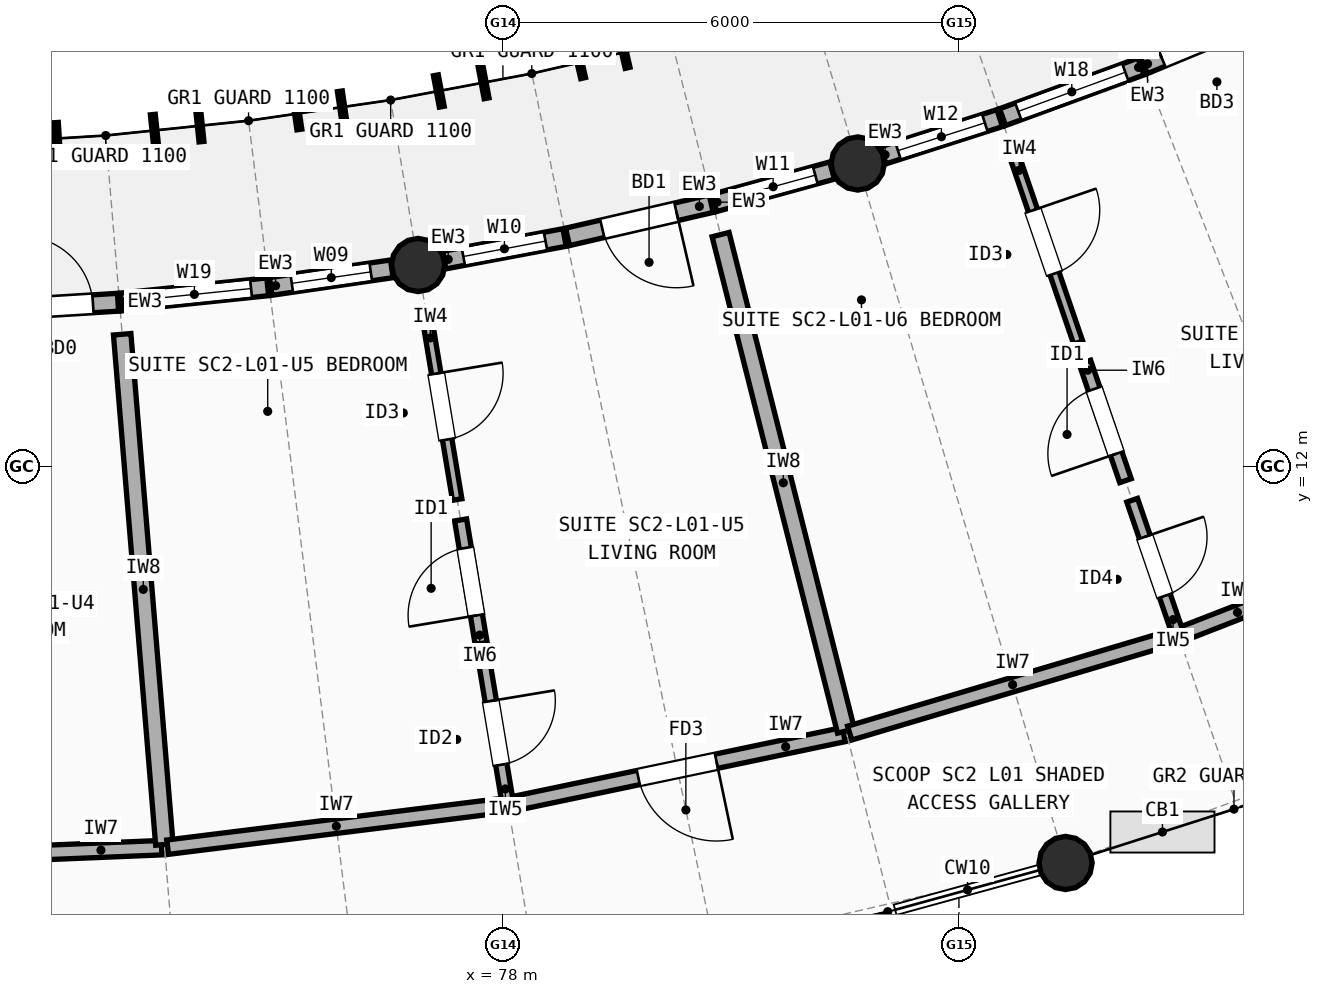
"""IFC4 building model, lengths in metres.
Left out: names, types, materials, properties, quantities, classifications, styles, units other than length and angle.
Written with IfcOpenShell. Run it as: python <this file> out.ifc"""

import sys

from ifc_helpers import new_model, si_unit, direction, frame, frame_2d, origin, origin_2d, place, context, subcontext, project, spatial, rectangle, circle, extrude, element, fill, save


model = new_model("IFC4")
c1 = context("Model", 3, precision=1e-05, world=origin(), true_north=direction((0.0, 1.0)))
c2 = subcontext(c1, "Body", "Model", "MODEL_VIEW")
j1 = project(units=[si_unit("LENGTHUNIT", "METRE"), si_unit("PLANEANGLEUNIT", "RADIAN")], contexts=[c1])
p1 = place(None, origin())
s1 = spatial("IfcSite", under=j1, at=p1, CompositionType="ELEMENT")
p2 = place(p1, origin())
s2 = spatial("IfcBuilding", under=s1, at=p2, CompositionType="ELEMENT")
p3 = place(p2, frame((0.0, 0.0, 4.5)))
s3 = spatial("IfcBuildingStorey", under=s2, at=p3, CompositionType="ELEMENT", Elevation=4.5)
for number, where, z_axis, x_axis in (
    (1, (76.885, 14.652, 0.0), (0.0, 0.0, 1.0), (1.0, 0.0, 0.0)),
    (2, (82.669, 15.988, 0.0), (0.0, 0.0, 1.0), (1.0, 0.0, 0.0)),
    (3, (85.403, 6.785, 0.0), (0.0, 0.0, 1.0), (1.0, 0.0, 0.0)),
):
    element("IfcColumn", number, at=place(p3, frame(where, z_axis=z_axis, x_axis=x_axis)), inside=s3, PredefinedType="COLUMN", context=c2, shape_type="SweptSolid", body=[
        extrude(circle(Radius=0.35, at=origin_2d()), origin(), (0.0, 0.0, 1.0), 2.948),
    ])
p4 = place(p3, frame((71.329, 14.062, 0.0), z_axis=(0.0, 0.0, 1.0), x_axis=(0.998084310064, 0.061868489594, 0.0)))
e4 = element("IfcWall", 4, at=p4, inside=s3, PredefinedType="STANDARD", context=c2, shape_type="SweptSolid", body=[
    extrude(rectangle(XDim=1.61, YDim=0.235, at=frame_2d((0.805, 0.0))), origin(), (0.0, 0.0, 1.0), 2.684),
])
p5 = place(p4, frame((0.33, 0.0, 0.0)))
e5 = element("IfcOpeningElement", 5, at=p5, cuts=e4, PredefinedType="OPENING", context=c2, shape_type="SweptSolid", body=[
    extrude(rectangle(XDim=0.95, YDim=2.12, at=frame_2d((0.475, 1.06))), frame((0.0, 0.127, 0.0), z_axis=(0.0, -1.0, 0.0), x_axis=(1.0, 0.0, 0.0)), (0.0, 0.0, 1.0), 0.255),
])
p6 = place(p3, frame((72.976, 14.165, 0.0), z_axis=(0.0, 0.0, 1.0), x_axis=(0.994688684624, 0.10292920228, 0.0)))
e6 = element("IfcWall", 6, at=p6, inside=s3, PredefinedType="STANDARD", context=c2, shape_type="SweptSolid", body=[
    extrude(rectangle(XDim=1.94, YDim=0.235, at=frame_2d((0.97, 0.0))), origin(), (0.0, 0.0, 1.0), 2.684),
])
p7 = place(p6, frame((0.22, 0.0, 0.85)))
e7 = element("IfcOpeningElement", 7, at=p7, cuts=e6, PredefinedType="OPENING", context=c2, shape_type="SweptSolid", body=[
    extrude(rectangle(XDim=1.5, YDim=1.5, at=frame_2d((0.75, 0.75))), frame((0.0, 0.127, 0.0), z_axis=(0.0, -1.0, 0.0), x_axis=(1.0, 0.0, 0.0)), (0.0, 0.0, 1.0), 0.255),
])
p8 = place(p3, frame((74.945, 14.37, 0.0), z_axis=(0.0, 0.0, 1.0), x_axis=(0.98961312767, 0.143756243492, 0.0)))
e8 = element("IfcWall", 8, at=p8, inside=s3, PredefinedType="STANDARD", context=c2, shape_type="SweptSolid", body=[
    extrude(rectangle(XDim=1.61, YDim=0.235, at=frame_2d((0.805, 0.0))), origin(), (0.0, 0.0, 1.0), 2.684),
])
p9 = place(p8, frame((0.28, 0.0, 0.85)))
e9 = element("IfcOpeningElement", 9, at=p9, cuts=e8, PredefinedType="OPENING", context=c2, shape_type="SweptSolid", body=[
    extrude(rectangle(XDim=1.05, YDim=1.35, at=frame_2d((0.525, 0.675))), frame((0.0, 0.127, 0.0), z_axis=(0.0, -1.0, 0.0), x_axis=(1.0, 0.0, 0.0)), (0.0, 0.0, 1.0), 0.255),
])
p10 = place(p3, frame((77.229, 14.717, 0.0), z_axis=(0.0, 0.0, 1.0), x_axis=(0.982794848755, 0.184700528589, 0.0)))
e10 = element("IfcWall", 10, at=p10, inside=s3, PredefinedType="STANDARD", context=c2, shape_type="SweptSolid", body=[
    extrude(rectangle(XDim=1.61, YDim=0.235, at=frame_2d((0.805, 0.0))), origin(), (0.0, 0.0, 1.0), 2.684),
])
p11 = place(p10, frame((0.255, 0.0, 0.85)))
e11 = element("IfcOpeningElement", 11, at=p11, cuts=e10, PredefinedType="OPENING", context=c2, shape_type="SweptSolid", body=[
    extrude(rectangle(XDim=1.1, YDim=1.45, at=frame_2d((0.55, 0.725))), frame((0.0, 0.127, 0.0), z_axis=(0.0, -1.0, 0.0), x_axis=(1.0, 0.0, 0.0)), (0.0, 0.0, 1.0), 0.255),
])
p12 = place(p3, frame((78.85, 15.022, 0.0), z_axis=(0.0, 0.0, 1.0), x_axis=(0.974359373104, 0.224997360081, 0.0)))
e12 = element("IfcWall", 12, at=p12, inside=s3, PredefinedType="STANDARD", context=c2, shape_type="SweptSolid", body=[
    extrude(rectangle(XDim=1.94, YDim=0.235, at=frame_2d((0.97, 0.0))), origin(), (0.0, 0.0, 1.0), 2.684),
])
p13 = place(p12, frame((0.47, 0.0, 0.0)))
e13 = element("IfcOpeningElement", 13, at=p13, cuts=e12, PredefinedType="OPENING", context=c2, shape_type="SweptSolid", body=[
    extrude(rectangle(XDim=1.0, YDim=2.15, at=frame_2d((0.5, 1.075))), frame((0.0, 0.127, 0.0), z_axis=(0.0, -1.0, 0.0), x_axis=(1.0, 0.0, 0.0)), (0.0, 0.0, 1.0), 0.255),
])
p14 = place(p3, frame((80.779, 15.468, 0.0), z_axis=(0.0, 0.0, 1.0), x_axis=(0.96427223836, 0.264913288318, 0.0)))
e14 = element("IfcWall", 14, at=p14, inside=s3, PredefinedType="STANDARD", context=c2, shape_type="SweptSolid", body=[
    extrude(rectangle(XDim=1.61, YDim=0.235, at=frame_2d((0.805, 0.0))), origin(), (0.0, 0.0, 1.0), 2.684),
])
p15 = place(p14, frame((0.23, 0.0, 0.85)))
e15 = element("IfcOpeningElement", 15, at=p15, cuts=e14, PredefinedType="OPENING", context=c2, shape_type="SweptSolid", body=[
    extrude(rectangle(XDim=1.15, YDim=1.45, at=frame_2d((0.575, 0.725))), frame((0.0, 0.127, 0.0), z_axis=(0.0, -1.0, 0.0), x_axis=(1.0, 0.0, 0.0)), (0.0, 0.0, 1.0), 0.255),
])
p16 = place(p3, frame((83.003, 16.094, 0.0), z_axis=(0.0, 0.0, 1.0), x_axis=(0.952508629145, 0.304511594861, 0.0)))
e16 = element("IfcWall", 16, at=p16, inside=s3, PredefinedType="STANDARD", context=c2, shape_type="SweptSolid", body=[
    extrude(rectangle(XDim=1.61, YDim=0.235, at=frame_2d((0.805, 0.0))), origin(), (0.0, 0.0, 1.0), 2.684),
])
p17 = place(p16, frame((0.205, 0.0, 0.85)))
e17 = element("IfcOpeningElement", 17, at=p17, cuts=e16, PredefinedType="OPENING", context=c2, shape_type="SweptSolid", body=[
    extrude(rectangle(XDim=1.2, YDim=1.35, at=frame_2d((0.6, 0.675))), frame((0.0, 0.127, 0.0), z_axis=(0.0, -1.0, 0.0), x_axis=(1.0, 0.0, 0.0)), (0.0, 0.0, 1.0), 0.255),
])
p18 = place(p3, frame((84.574, 16.597, 0.0), z_axis=(0.0, 0.0, 1.0), x_axis=(0.939178301307, 0.343429932235, 0.0)))
e18 = element("IfcWall", 18, at=p18, inside=s3, PredefinedType="STANDARD", context=c2, shape_type="SweptSolid", body=[
    extrude(rectangle(XDim=1.94, YDim=0.235, at=frame_2d((0.97, 0.0))), origin(), (0.0, 0.0, 1.0), 2.684),
])
p19 = place(p18, frame((0.22, 0.0, 0.85)))
e19 = element("IfcOpeningElement", 19, at=p19, cuts=e18, PredefinedType="OPENING", context=c2, shape_type="SweptSolid", body=[
    extrude(rectangle(XDim=1.5, YDim=1.4, at=frame_2d((0.75, 0.7))), frame((0.0, 0.127, 0.0), z_axis=(0.0, -1.0, 0.0), x_axis=(1.0, 0.0, 0.0)), (0.0, 0.0, 1.0), 0.255),
])
p20 = place(p3, frame((86.433, 17.278, 0.0), z_axis=(0.0, 0.0, 1.0), x_axis=(0.924159027547, 0.382007973481, 0.0)))
e20 = element("IfcWall", 20, at=p20, inside=s3, PredefinedType="STANDARD", context=c2, shape_type="SweptSolid", body=[
    extrude(rectangle(XDim=1.61, YDim=0.235, at=frame_2d((0.805, 0.0))), origin(), (0.0, 0.0, 1.0), 2.684),
])
p21 = place(p20, frame((0.255, 0.0, 0.0)))
e21 = element("IfcOpeningElement", 21, at=p21, cuts=e20, PredefinedType="OPENING", context=c2, shape_type="SweptSolid", body=[
    extrude(rectangle(XDim=1.1, YDim=2.15, at=frame_2d((0.55, 1.075))), frame((0.0, 0.127, 0.0), z_axis=(0.0, -1.0, 0.0), x_axis=(1.0, 0.0, 0.0)), (0.0, 0.0, 1.0), 0.255),
])
p22 = place(p3, frame((69.04, 6.802, 0.0), z_axis=(0.0, 0.0, 1.0), x_axis=(0.999148329529, 0.041262762871, 0.0)))
e22 = element("IfcWall", 22, at=p22, inside=s3, PredefinedType="SOLIDWALL", context=c2, shape_type="SweptSolid", body=[
    extrude(rectangle(XDim=4.473, YDim=0.19, at=frame_2d((2.237, 0.0))), origin(), (0.0, 0.0, 1.0), 2.722),
])
p23 = place(p22, frame((1.747, 0.0, 0.0)))
e23 = element("IfcOpeningElement", 23, at=p23, cuts=e22, PredefinedType="OPENING", context=c2, shape_type="SweptSolid", body=[
    extrude(rectangle(XDim=0.98, YDim=2.15, at=frame_2d((0.49, 1.075))), frame((0.0, 0.105, 0.0), z_axis=(0.0, -1.0, 0.0), x_axis=(1.0, 0.0, 0.0)), (0.0, 0.0, 1.0), 0.21),
])
p24 = place(p3, frame((72.991, 13.741, 0.0), z_axis=(0.0, 0.0, 1.0), x_axis=(0.082418569382, -0.996597802236, 0.0)))
e24 = element("IfcWall", 24, at=p24, inside=s3, PredefinedType="SOLIDWALL", context=c2, shape_type="SweptSolid", body=[
    extrude(rectangle(XDim=6.736, YDim=0.23, at=frame_2d((3.368, 0.0))), origin(), (0.0, 0.0, 1.0), 2.742),
])
p25 = place(p3, frame((73.589, 6.993, 0.0), z_axis=(0.0, 0.0, 1.0), x_axis=(0.992349088432, 0.123463705959, 0.0)))
e25 = element("IfcWall", 25, at=p25, inside=s3, PredefinedType="SOLIDWALL", context=c2, shape_type="SweptSolid", body=[
    extrude(rectangle(XDim=4.473, YDim=0.19, at=frame_2d((2.236, 0.0))), origin(), (0.0, 0.0, 1.0), 2.762),
])
p26 = place(p3, frame((78.107, 7.558, 0.0), z_axis=(0.0, 0.0, 1.0), x_axis=(0.978806148413, 0.204788973894, 0.0)))
e26 = element("IfcWall", 26, at=p26, inside=s3, PredefinedType="SOLIDWALL", context=c2, shape_type="SweptSolid", body=[
    extrude(rectangle(XDim=4.473, YDim=0.19, at=frame_2d((2.236, 0.0))), origin(), (0.0, 0.0, 1.0), 2.742),
])
p27 = place(p26, frame((1.711, 0.0, 0.0)))
e27 = element("IfcOpeningElement", 27, at=p27, cuts=e26, PredefinedType="OPENING", context=c2, shape_type="SweptSolid", body=[
    extrude(rectangle(XDim=1.05, YDim=2.15, at=frame_2d((0.525, 1.075))), frame((0.0, 0.105, 0.0), z_axis=(0.0, -1.0, 0.0), x_axis=(1.0, 0.0, 0.0)), (0.0, 0.0, 1.0), 0.21),
])
p28 = place(p3, frame((76.991, 14.013, 0.0), z_axis=(0.0, 0.0, 1.0), x_axis=(0.16420741421, -0.986425833562, 0.0)))
e28 = element("IfcWall", 28, at=p28, inside=s3, PredefinedType="PARTITIONING", context=c2, shape_type="SweptSolid", body=[
    extrude(rectangle(XDim=2.48, YDim=0.125, at=frame_2d((1.24, 0.0))), origin(), (0.0, 0.0, 1.0), 2.722),
])
p29 = place(p28, frame((0.8, 0.0, 0.0)))
e29 = element("IfcOpeningElement", 29, at=p29, cuts=e28, PredefinedType="OPENING", context=c2, shape_type="SweptSolid", body=[
    extrude(rectangle(XDim=0.88, YDim=2.1, at=frame_2d((0.44, 1.05))), frame((0.0, 0.073, 0.0), z_axis=(0.0, -1.0, 0.0), x_axis=(1.0, 0.0, 0.0)), (0.0, 0.0, 1.0), 0.145),
])
p30 = place(p3, frame((77.443, 11.298, 0.0), z_axis=(0.0, 0.0, 1.0), x_axis=(0.164158726706, -0.986433937193, 0.0)))
e30 = element("IfcWall", 30, at=p30, inside=s3, PredefinedType="PLUMBINGWALL", context=c2, shape_type="SweptSolid", body=[
    extrude(rectangle(XDim=1.648, YDim=0.16, at=frame_2d((0.824, 0.0))), origin(), (0.0, 0.0, 1.0), 2.722),
])
p31 = place(p30, frame((0.374, 0.0, 0.0)))
e31 = element("IfcOpeningElement", 31, at=p31, cuts=e30, PredefinedType="OPENING", context=c2, shape_type="SweptSolid", body=[
    extrude(rectangle(XDim=0.9, YDim=2.1, at=frame_2d((0.45, 1.05))), frame((0.0, 0.09, 0.0), z_axis=(0.0, -1.0, 0.0), x_axis=(1.0, 0.0, 0.0)), (0.0, 0.0, 1.0), 0.18),
])
p32 = place(p3, frame((77.759, 9.404, 0.0), z_axis=(0.0, 0.0, 1.0), x_axis=(0.164269882379, -0.986415432636, 0.0)))
e32 = element("IfcWall", 32, at=p32, inside=s3, PredefinedType="PARTITIONING", context=c2, shape_type="SweptSolid", body=[
    extrude(rectangle(XDim=1.84, YDim=0.15, at=frame_2d((0.92, 0.0))), origin(), (0.0, 0.0, 1.0), 2.722),
])
p33 = place(p32, frame((0.495, 0.0, 0.0)))
e33 = element("IfcOpeningElement", 33, at=p33, cuts=e32, PredefinedType="OPENING", context=c2, shape_type="SweptSolid", body=[
    extrude(rectangle(XDim=0.85, YDim=2.1, at=frame_2d((0.425, 1.05))), frame((0.0, 0.085, 0.0), z_axis=(0.0, -1.0, 0.0), x_axis=(1.0, 0.0, 0.0)), (0.0, 0.0, 1.0), 0.17),
])
p34 = place(p3, frame((80.864, 15.052, 0.0), z_axis=(0.0, 0.0, 1.0), x_axis=(0.244982481903, -0.969527505314, 0.0)))
e34 = element("IfcWall", 34, at=p34, inside=s3, PredefinedType="SOLIDWALL", context=c2, shape_type="SweptSolid", body=[
    extrude(rectangle(XDim=6.736, YDim=0.23, at=frame_2d((3.368, 0.0))), origin(), (0.0, 0.0, 1.0), 2.762),
])
p35 = place(p3, frame((82.562, 8.494, 0.0), z_axis=(0.0, 0.0, 1.0), x_axis=(0.958602413557, 0.28474798107, 0.0)))
e35 = element("IfcWall", 35, at=p35, inside=s3, PredefinedType="SOLIDWALL", context=c2, shape_type="SweptSolid", body=[
    extrude(rectangle(XDim=4.473, YDim=0.19, at=frame_2d((2.236, 0.0))), origin(), (0.0, 0.0, 1.0), 2.722),
])
p36 = place(p3, frame((86.926, 9.793, 0.0), z_axis=(0.0, 0.0, 1.0), x_axis=(0.931847867525, 0.362849213571, 0.0)))
e36 = element("IfcWall", 36, at=p36, inside=s3, PredefinedType="SOLIDWALL", context=c2, shape_type="SweptSolid", body=[
    extrude(rectangle(XDim=4.473, YDim=0.19, at=frame_2d((2.237, 0.0))), origin(), (0.0, 0.0, 1.0), 2.762),
])
p37 = place(p36, frame((1.737, 0.0, 0.0)))
e37 = element("IfcOpeningElement", 37, at=p37, cuts=e36, PredefinedType="OPENING", context=c2, shape_type="SweptSolid", body=[
    extrude(rectangle(XDim=1.0, YDim=2.15, at=frame_2d((0.5, 1.075))), frame((0.0, 0.105, 0.0), z_axis=(0.0, -1.0, 0.0), x_axis=(1.0, 0.0, 0.0)), (0.0, 0.0, 1.0), 0.21),
])
p38 = place(p3, frame((84.662, 16.28, 0.0), z_axis=(0.0, 0.0, 1.0), x_axis=(0.32401221778, -0.94605289637, 0.0)))
e38 = element("IfcWall", 38, at=p38, inside=s3, PredefinedType="PARTITIONING", context=c2, shape_type="SweptSolid", body=[
    extrude(rectangle(XDim=2.8, YDim=0.125, at=frame_2d((1.4, 0.0))), origin(), (0.0, 0.0, 1.0), 2.742),
])
p39 = place(p38, frame((0.96, 0.0, 0.0)))
e39 = element("IfcOpeningElement", 39, at=p39, cuts=e38, PredefinedType="OPENING", context=c2, shape_type="SweptSolid", body=[
    extrude(rectangle(XDim=0.88, YDim=2.1, at=frame_2d((0.44, 1.05))), frame((0.0, 0.073, 0.0), z_axis=(0.0, -1.0, 0.0), x_axis=(1.0, 0.0, 0.0)), (0.0, 0.0, 1.0), 0.145),
])
p40 = place(p3, frame((85.657, 13.374, 0.0), z_axis=(0.0, 0.0, 1.0), x_axis=(0.324127376206, -0.946013448104, 0.0)))
e40 = element("IfcWall", 40, at=p40, inside=s3, PredefinedType="PLUMBINGWALL", context=c2, shape_type="SweptSolid", body=[
    extrude(rectangle(XDim=1.648, YDim=0.16, at=frame_2d((0.824, 0.0))), origin(), (0.0, 0.0, 1.0), 2.742),
])
p41 = place(p40, frame((0.374, 0.0, 0.0)))
e41 = element("IfcOpeningElement", 41, at=p41, cuts=e40, PredefinedType="OPENING", context=c2, shape_type="SweptSolid", body=[
    extrude(rectangle(XDim=0.9, YDim=2.1, at=frame_2d((0.45, 1.05))), frame((0.0, 0.09, 0.0), z_axis=(0.0, -1.0, 0.0), x_axis=(1.0, 0.0, 0.0)), (0.0, 0.0, 1.0), 0.18),
])
p42 = place(p3, frame((86.279, 11.558, 0.0), z_axis=(0.0, 0.0, 1.0), x_axis=(0.323978335312, -0.946064500046, 0.0)))
e42 = element("IfcWall", 42, at=p42, inside=s3, PredefinedType="PARTITIONING", context=c2, shape_type="SweptSolid", body=[
    extrude(rectangle(XDim=1.84, YDim=0.15, at=frame_2d((0.92, 0.0))), origin(), (0.0, 0.0, 1.0), 2.742),
])
p43 = place(p42, frame((0.51, 0.0, 0.0)))
e43 = element("IfcOpeningElement", 43, at=p43, cuts=e42, PredefinedType="OPENING", context=c2, shape_type="SweptSolid", body=[
    extrude(rectangle(XDim=0.82, YDim=2.08, at=frame_2d((0.41, 1.04))), frame((0.0, 0.085, 0.0), z_axis=(0.0, -1.0, 0.0), x_axis=(1.0, 0.0, 0.0)), (0.0, 0.0, 1.0), 0.17),
])
p44 = place(p5, origin())
e44 = element("IfcDoor", 44, at=p44, inside=s3, OperationType="SINGLE_SWING_LEFT", PredefinedType="DOOR", context=c2, shape_type="SweptSolid", body=[
    extrude(rectangle(XDim=0.95, YDim=2.12, at=frame_2d((0.475, 1.06))), frame((0.0, 0.025, 0.0), z_axis=(0.0, -1.0, 0.0), x_axis=(1.0, 0.0, 0.0)), (0.0, 0.0, 1.0), 0.05),
])
fill(e5, e44)
p45 = place(p7, origin())
e45 = element("IfcWindow", 45, at=p45, inside=s3, PartitioningType="SINGLE_PANEL", PredefinedType="WINDOW", context=c2, shape_type="SweptSolid", body=[
    extrude(rectangle(XDim=1.5, YDim=1.5, at=frame_2d((0.75, 0.75))), frame((0.0, 0.03, 0.0), z_axis=(0.0, -1.0, 0.0), x_axis=(1.0, 0.0, 0.0)), (0.0, 0.0, 1.0), 0.06),
])
fill(e7, e45)
p46 = place(p9, origin())
e46 = element("IfcWindow", 46, at=p46, inside=s3, PartitioningType="SINGLE_PANEL", PredefinedType="WINDOW", context=c2, shape_type="SweptSolid", body=[
    extrude(rectangle(XDim=1.05, YDim=1.35, at=frame_2d((0.525, 0.675))), frame((0.0, 0.03, 0.0), z_axis=(0.0, -1.0, 0.0), x_axis=(1.0, 0.0, 0.0)), (0.0, 0.0, 1.0), 0.06),
])
fill(e9, e46)
p47 = place(p11, origin())
e47 = element("IfcWindow", 47, at=p47, inside=s3, PartitioningType="SINGLE_PANEL", PredefinedType="WINDOW", context=c2, shape_type="SweptSolid", body=[
    extrude(rectangle(XDim=1.1, YDim=1.45, at=frame_2d((0.55, 0.725))), frame((0.0, 0.03, 0.0), z_axis=(0.0, -1.0, 0.0), x_axis=(1.0, 0.0, 0.0)), (0.0, 0.0, 1.0), 0.06),
])
fill(e11, e47)
p48 = place(p13, origin())
e48 = element("IfcDoor", 48, at=p48, inside=s3, OperationType="SINGLE_SWING_RIGHT", PredefinedType="DOOR", context=c2, shape_type="SweptSolid", body=[
    extrude(rectangle(XDim=1.0, YDim=2.15, at=frame_2d((0.5, 1.075))), frame((0.0, 0.025, 0.0), z_axis=(0.0, -1.0, 0.0), x_axis=(1.0, 0.0, 0.0)), (0.0, 0.0, 1.0), 0.05),
])
fill(e13, e48)
p49 = place(p15, origin())
e49 = element("IfcWindow", 49, at=p49, inside=s3, PartitioningType="SINGLE_PANEL", PredefinedType="WINDOW", context=c2, shape_type="SweptSolid", body=[
    extrude(rectangle(XDim=1.15, YDim=1.45, at=frame_2d((0.575, 0.725))), frame((0.0, 0.03, 0.0), z_axis=(0.0, -1.0, 0.0), x_axis=(1.0, 0.0, 0.0)), (0.0, 0.0, 1.0), 0.06),
])
fill(e15, e49)
p50 = place(p17, origin())
e50 = element("IfcWindow", 50, at=p50, inside=s3, PartitioningType="SINGLE_PANEL", PredefinedType="WINDOW", context=c2, shape_type="SweptSolid", body=[
    extrude(rectangle(XDim=1.2, YDim=1.35, at=frame_2d((0.6, 0.675))), frame((0.0, 0.03, 0.0), z_axis=(0.0, -1.0, 0.0), x_axis=(1.0, 0.0, 0.0)), (0.0, 0.0, 1.0), 0.06),
])
fill(e17, e50)
p51 = place(p19, origin())
e51 = element("IfcWindow", 51, at=p51, inside=s3, PartitioningType="SINGLE_PANEL", PredefinedType="WINDOW", context=c2, shape_type="SweptSolid", body=[
    extrude(rectangle(XDim=1.5, YDim=1.4, at=frame_2d((0.75, 0.7))), frame((0.0, 0.03, 0.0), z_axis=(0.0, -1.0, 0.0), x_axis=(1.0, 0.0, 0.0)), (0.0, 0.0, 1.0), 0.06),
])
fill(e19, e51)
p52 = place(p21, origin())
e52 = element("IfcDoor", 52, at=p52, inside=s3, OperationType="SINGLE_SWING_LEFT", PredefinedType="DOOR", context=c2, shape_type="SweptSolid", body=[
    extrude(rectangle(XDim=1.1, YDim=2.15, at=frame_2d((0.55, 1.075))), frame((0.0, 0.025, 0.0), z_axis=(0.0, -1.0, 0.0), x_axis=(1.0, 0.0, 0.0)), (0.0, 0.0, 1.0), 0.05),
])
fill(e21, e52)
p53 = place(p27, origin())
e53 = element("IfcDoor", 53, at=p53, inside=s3, OperationType="SINGLE_SWING_RIGHT", PredefinedType="DOOR", context=c2, shape_type="SweptSolid", body=[
    extrude(rectangle(XDim=1.05, YDim=2.15, at=frame_2d((0.525, 1.075))), frame((0.0, 0.025, 0.0), z_axis=(0.0, -1.0, 0.0), x_axis=(1.0, 0.0, 0.0)), (0.0, 0.0, 1.0), 0.05),
])
fill(e27, e53)
p54 = place(p29, origin())
e54 = element("IfcDoor", 54, at=p54, inside=s3, OperationType="SINGLE_SWING_LEFT", PredefinedType="DOOR", context=c2, shape_type="SweptSolid", body=[
    extrude(rectangle(XDim=0.88, YDim=2.1, at=frame_2d((0.44, 1.05))), frame((0.0, 0.025, 0.0), z_axis=(0.0, -1.0, 0.0), x_axis=(1.0, 0.0, 0.0)), (0.0, 0.0, 1.0), 0.05),
])
fill(e29, e54)
p55 = place(p31, origin())
e55 = element("IfcDoor", 55, at=p55, inside=s3, OperationType="SINGLE_SWING_RIGHT", PredefinedType="DOOR", context=c2, shape_type="SweptSolid", body=[
    extrude(rectangle(XDim=0.9, YDim=2.1, at=frame_2d((0.45, 1.05))), frame((0.0, 0.025, 0.0), z_axis=(0.0, -1.0, 0.0), x_axis=(1.0, 0.0, 0.0)), (0.0, 0.0, 1.0), 0.05),
])
fill(e31, e55)
p56 = place(p33, origin())
e56 = element("IfcDoor", 56, at=p56, inside=s3, OperationType="SINGLE_SWING_LEFT", PredefinedType="DOOR", context=c2, shape_type="SweptSolid", body=[
    extrude(rectangle(XDim=0.85, YDim=2.1, at=frame_2d((0.425, 1.05))), frame((0.0, 0.025, 0.0), z_axis=(0.0, -1.0, 0.0), x_axis=(1.0, 0.0, 0.0)), (0.0, 0.0, 1.0), 0.05),
])
fill(e33, e56)
p57 = place(p39, origin())
e57 = element("IfcDoor", 57, at=p57, inside=s3, OperationType="SINGLE_SWING_LEFT", PredefinedType="DOOR", context=c2, shape_type="SweptSolid", body=[
    extrude(rectangle(XDim=0.88, YDim=2.1, at=frame_2d((0.44, 1.05))), frame((0.0, 0.025, 0.0), z_axis=(0.0, -1.0, 0.0), x_axis=(1.0, 0.0, 0.0)), (0.0, 0.0, 1.0), 0.05),
])
fill(e39, e57)
p58 = place(p41, origin())
e58 = element("IfcDoor", 58, at=p58, inside=s3, OperationType="SINGLE_SWING_RIGHT", PredefinedType="DOOR", context=c2, shape_type="SweptSolid", body=[
    extrude(rectangle(XDim=0.9, YDim=2.1, at=frame_2d((0.45, 1.05))), frame((0.0, 0.025, 0.0), z_axis=(0.0, -1.0, 0.0), x_axis=(1.0, 0.0, 0.0)), (0.0, 0.0, 1.0), 0.05),
])
fill(e41, e58)
p59 = place(p43, origin())
e59 = element("IfcDoor", 59, at=p59, inside=s3, OperationType="SINGLE_SWING_LEFT", PredefinedType="DOOR", context=c2, shape_type="SweptSolid", body=[
    extrude(rectangle(XDim=0.82, YDim=2.08, at=frame_2d((0.41, 1.04))), frame((0.0, 0.025, 0.0), z_axis=(0.0, -1.0, 0.0), x_axis=(1.0, 0.0, 0.0)), (0.0, 0.0, 1.0), 0.05),
])
fill(e43, e59)
save(model, sys.argv[1])
